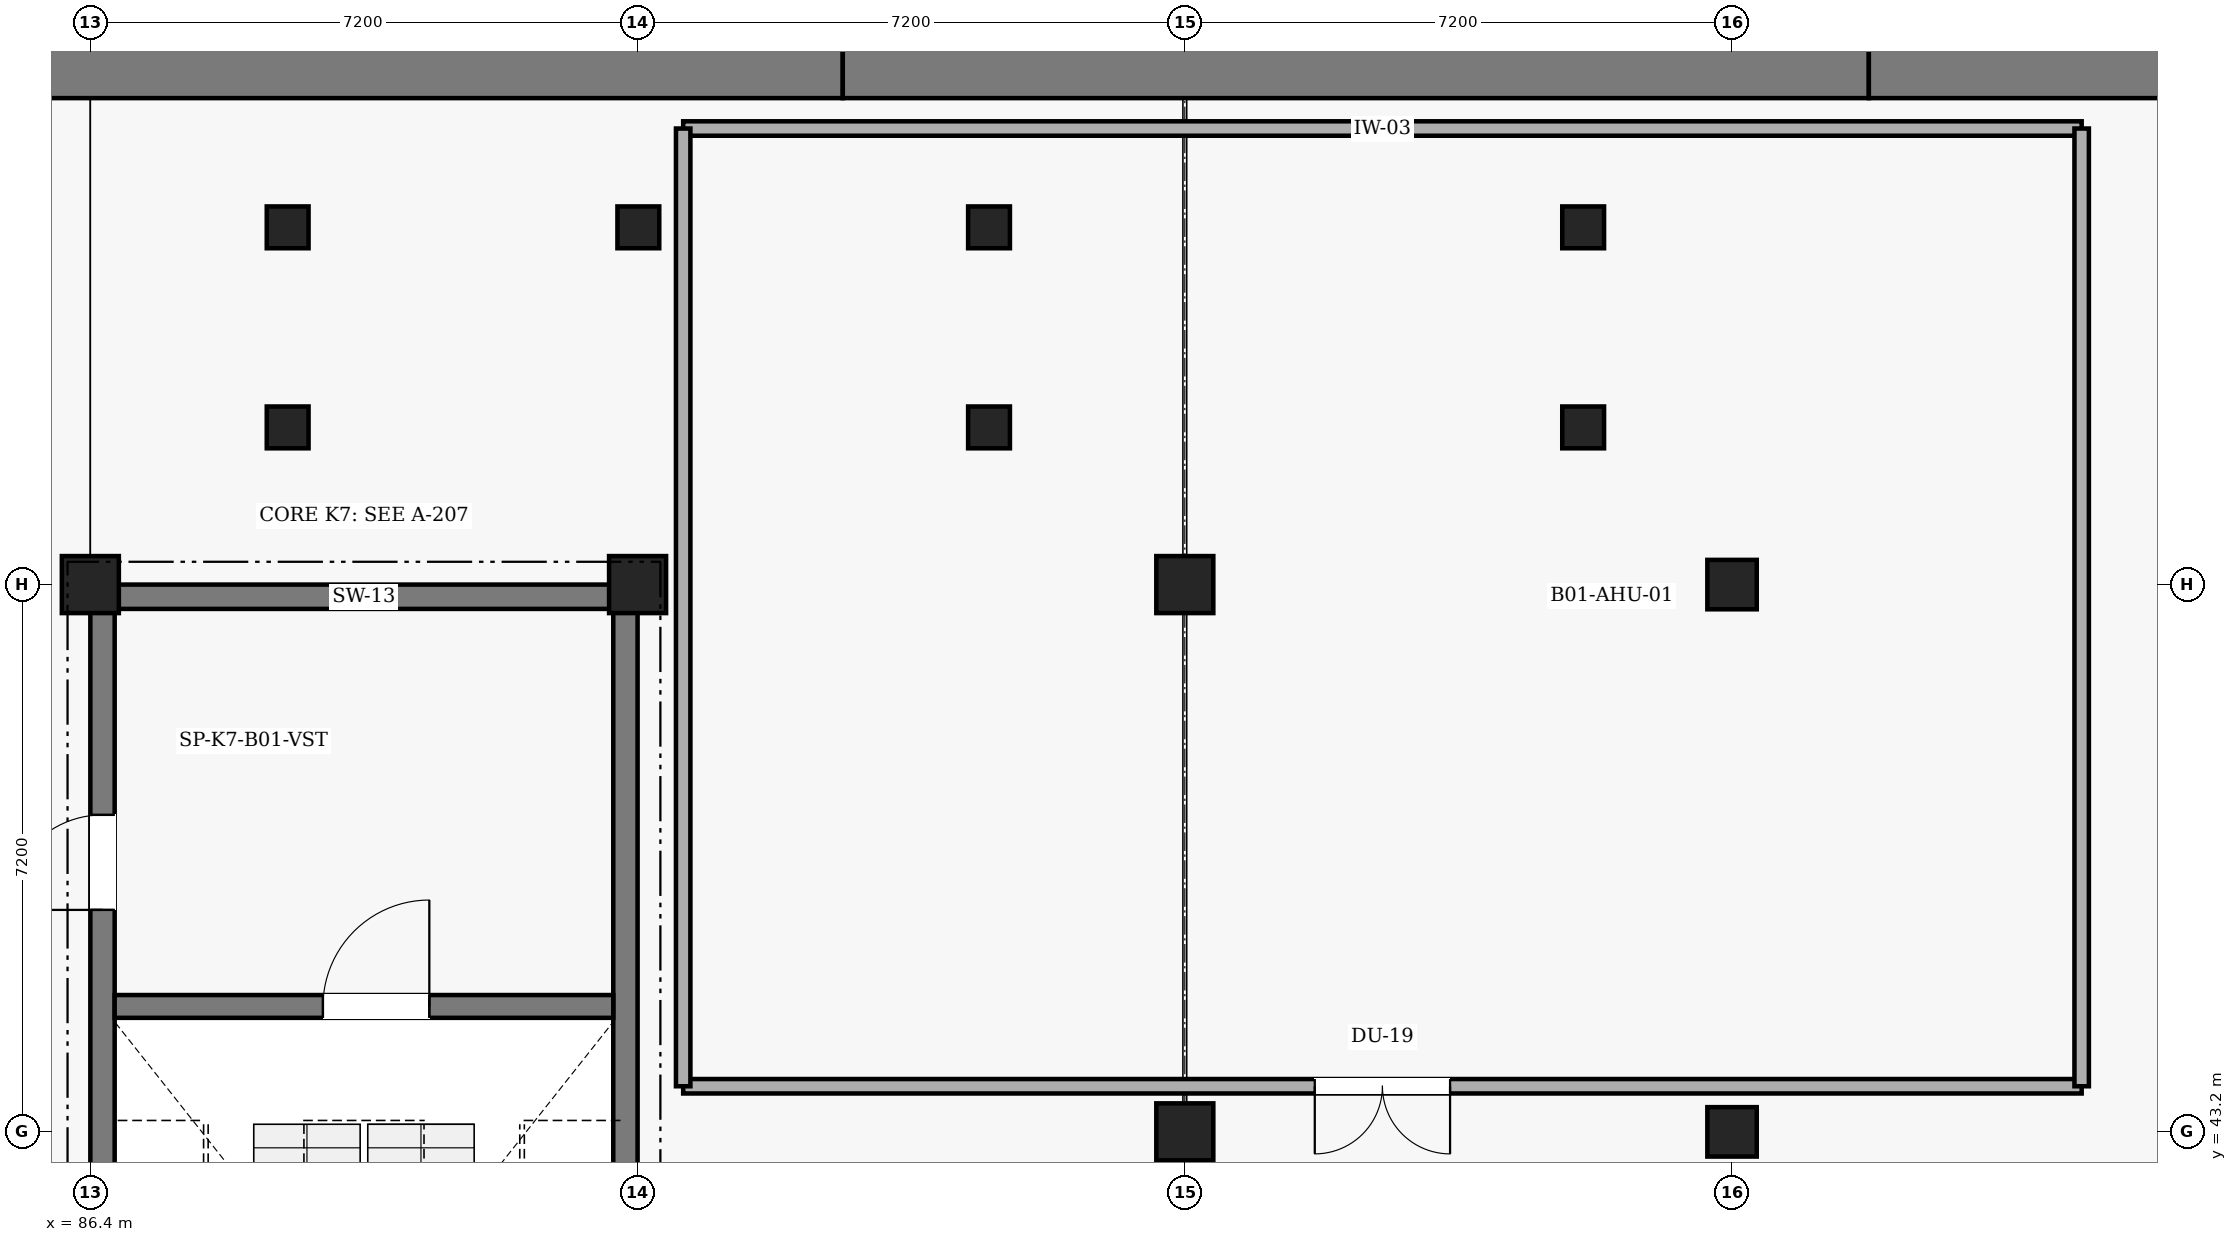
"""IFC4 building model, lengths in metres.
Left out: names, types, materials, properties, quantities, classifications, styles, units other than length and angle.
Written with IfcOpenShell. Run it as: python <this file> out.ifc"""

import sys

from ifc_helpers import new_model, si_unit, direction, frame, frame_2d, origin, origin_2d, place, context, subcontext, project, spatial, rectangle, extrude, element, fill, save


model = new_model("IFC4")
c1 = context("Model", 3, precision=1e-05, world=origin(), true_north=direction((0.0, 1.0)))
c2 = subcontext(c1, "Body", "Model", "MODEL_VIEW")
j1 = project(units=[si_unit("LENGTHUNIT", "METRE"), si_unit("PLANEANGLEUNIT", "RADIAN")], contexts=[c1])
p1 = place(None, origin())
s1 = spatial("IfcSite", under=j1, at=p1, CompositionType="ELEMENT")
p2 = place(p1, origin())
s2 = spatial("IfcBuilding", under=s1, at=p2, CompositionType="ELEMENT")
p3 = place(p2, frame((0.0, 0.0, -5.4)))
s3 = spatial("IfcBuildingStorey", under=s2, at=p3, CompositionType="ELEMENT", Elevation=-5.4)
for number, where, z_axis, x_axis in (
    (1, (82.8, 57.2, 0.0), (0.0, 0.0, 1.0), (1.0, 0.0, 0.0)),
    (2, (96.3, 57.2, 0.0), (0.0, 0.0, 1.0), (1.0, 0.0, 0.0)),
):
    element("IfcWall", number, at=place(p3, frame(where, z_axis=z_axis, x_axis=x_axis)), inside=s3, PredefinedType="USERDEFINED", context=c2, shape_type="SweptSolid", body=[
        extrude(rectangle(XDim=13.5, YDim=0.8, at=frame_2d((6.75, 0.0))), origin(), (0.0, 0.0, 1.0), 4.95),
    ])
p4 = place(p3, frame((109.8, 57.2, 0.0), z_axis=(0.0, 0.0, 1.0), x_axis=(1.0, 0.0, 0.0)))
e3 = element("IfcWall", 3, at=p4, inside=s3, PredefinedType="USERDEFINED", context=c2, shape_type="SweptSolid", body=[
    extrude(rectangle(XDim=5.35, YDim=0.8, at=frame_2d((2.675, 0.0))), origin(), (0.0, 0.0, 1.0), 4.95),
])
p5 = place(p3, frame((86.4, 50.24, 0.0), z_axis=(0.0, 0.0, 1.0), x_axis=(1.0, 0.0, 0.0)))
e4 = element("IfcWall", 4, at=p5, inside=s3, PredefinedType="SHEAR", context=c2, shape_type="SweptSolid", body=[
    extrude(rectangle(XDim=7.2, YDim=0.32, at=frame_2d((3.6, 0.0))), origin(), (0.0, 0.0, 1.0), 5.4),
])
p6 = place(p3, frame((93.44, 50.08, 0.0), z_axis=(0.0, 0.0, 1.0), x_axis=(0.0, -1.0, 0.0)))
e5 = element("IfcWall", 5, at=p6, inside=s3, PredefinedType="SHEAR", context=c2, shape_type="SweptSolid", body=[
    extrude(rectangle(XDim=13.76, YDim=0.32, at=frame_2d((6.88, 0.0))), origin(), (0.0, 0.0, 1.0), 5.4),
])
p7 = place(p3, frame((86.56, 36.32, 0.0), z_axis=(0.0, 0.0, 1.0), x_axis=(0.0, 1.0, 0.0)))
e6 = element("IfcWall", 6, at=p7, inside=s3, PredefinedType="SHEAR", context=c2, shape_type="SweptSolid", body=[
    extrude(rectangle(XDim=13.76, YDim=0.32, at=frame_2d((6.88, 0.0))), origin(), (0.0, 0.0, 1.0), 5.4),
])
p8 = place(p7, frame((9.8, 0.0, 0.0)))
e7 = element("IfcOpeningElement", 7, at=p8, cuts=e6, PredefinedType="OPENING", context=c2, shape_type="SweptSolid", body=[
    extrude(rectangle(XDim=1.25, YDim=2.2, at=frame_2d((0.625, 1.1))), frame((0.0, 0.17, 0.0), z_axis=(0.0, -1.0, 0.0), x_axis=(1.0, 0.0, 0.0)), (0.0, 0.0, 1.0), 0.34),
])
p9 = place(p3, frame((86.72, 44.85, 0.0), z_axis=(0.0, 0.0, 1.0), x_axis=(1.0, 0.0, 0.0)))
e8 = element("IfcWall", 8, at=p9, inside=s3, PredefinedType="SHEAR", context=c2, shape_type="SweptSolid", body=[
    extrude(rectangle(XDim=6.56, YDim=0.3, at=frame_2d((3.28, 0.0))), origin(), (0.0, 0.0, 1.0), 5.4),
])
p10 = place(p9, frame((2.74, 0.0, 0.0)))
e9 = element("IfcOpeningElement", 9, at=p10, cuts=e8, PredefinedType="OPENING", context=c2, shape_type="SweptSolid", body=[
    extrude(rectangle(XDim=1.4, YDim=2.2, at=frame_2d((0.7, 1.1))), frame((0.0, 0.16, 0.0), z_axis=(0.0, -1.0, 0.0), x_axis=(1.0, 0.0, 0.0)), (0.0, 0.0, 1.0), 0.32),
])
for number, where, z_axis, x_axis in (
    (10, (86.4, 50.4, 0.0), (0.0, 0.0, 1.0), (1.0, 0.0, 0.0)),
    (11, (93.6, 50.4, 0.0), (0.0, 0.0, 1.0), (1.0, 0.0, 0.0)),
    (12, (100.8, 43.2, 0.0), (0.0, 0.0, 1.0), (1.0, 0.0, 0.0)),
    (13, (100.8, 50.4, 0.0), (0.0, 0.0, 1.0), (1.0, 0.0, 0.0)),
):
    element("IfcColumn", number, at=place(p3, frame(where, z_axis=z_axis, x_axis=x_axis)), inside=s3, PredefinedType="COLUMN", context=c2, shape_type="SweptSolid", body=[
        extrude(rectangle(XDim=0.75, YDim=0.75, at=origin_2d()), origin(), (0.0, 0.0, 1.0), 4.95),
    ])
for number, where, z_axis, x_axis in (
    (14, (108.0, 43.2, 0.0), (0.0, 0.0, 1.0), (1.0, 0.0, 0.0)),
    (15, (108.0, 50.4, 0.0), (0.0, 0.0, 1.0), (1.0, 0.0, 0.0)),
):
    element("IfcColumn", number, at=place(p3, frame(where, z_axis=z_axis, x_axis=x_axis)), inside=s3, PredefinedType="COLUMN", context=c2, shape_type="SweptSolid", body=[
        extrude(rectangle(XDim=0.65, YDim=0.65, at=origin_2d()), origin(), (0.0, 0.0, 1.0), 5.04),
    ])
for number, where, z_axis, x_axis in (
    (16, (106.041, 52.468, 0.0), (0.0, 0.0, 1.0), (1.0, 0.0, 0.0)),
    (17, (106.041, 55.1, 0.0), (0.0, 0.0, 1.0), (1.0, 0.0, 0.0)),
    (18, (88.996, 52.468, 0.0), (0.0, 0.0, 1.0), (1.0, 0.0, 0.0)),
    (19, (88.996, 55.1, 0.0), (0.0, 0.0, 1.0), (1.0, 0.0, 0.0)),
    (20, (93.61, 55.1, 0.0), (0.0, 0.0, 1.0), (1.0, 0.0, 0.0)),
    (21, (98.224, 52.468, 0.0), (0.0, 0.0, 1.0), (1.0, 0.0, 0.0)),
    (22, (98.224, 55.1, 0.0), (0.0, 0.0, 1.0), (1.0, 0.0, 0.0)),
):
    element("IfcColumn", number, at=place(p3, frame(where, z_axis=z_axis, x_axis=x_axis)), inside=s3, PredefinedType="COLUMN", context=c2, shape_type="SweptSolid", body=[
        extrude(rectangle(XDim=0.55, YDim=0.55, at=origin_2d()), origin(), (0.0, 0.0, 1.0), 4.95),
    ])
p11 = place(p3, frame((94.2, 56.4, 0.0), z_axis=(0.0, 0.0, 1.0), x_axis=(1.0, 0.0, 0.0)))
e23 = element("IfcWall", 23, at=p11, inside=s3, PredefinedType="PARTITIONING", context=c2, shape_type="SweptSolid", body=[
    extrude(rectangle(XDim=18.4, YDim=0.19, at=frame_2d((9.2, 0.0))), origin(), (0.0, 0.0, 1.0), 5.05),
])
p12 = place(p3, frame((112.6, 43.8, 0.0), z_axis=(0.0, 0.0, 1.0), x_axis=(-1.0, 0.0, 0.0)))
e24 = element("IfcWall", 24, at=p12, inside=s3, PredefinedType="PARTITIONING", context=c2, shape_type="SweptSolid", body=[
    extrude(rectangle(XDim=18.4, YDim=0.19, at=frame_2d((9.2, 0.0))), origin(), (0.0, 0.0, 1.0), 4.24),
])
p13 = place(p12, frame((8.31, 0.0, 0.0)))
e25 = element("IfcOpeningElement", 25, at=p13, cuts=e24, PredefinedType="OPENING", context=c2, shape_type="SweptSolid", body=[
    extrude(rectangle(XDim=1.78, YDim=2.28, at=frame_2d((0.89, 1.14))), frame((0.0, 0.105, 0.0), z_axis=(0.0, -1.0, 0.0), x_axis=(1.0, 0.0, 0.0)), (0.0, 0.0, 1.0), 0.21),
])
for number, where, z_axis, x_axis in (
    (26, (112.6, 56.4, 0.0), (0.0, 0.0, 1.0), (0.0, -1.0, 0.0)),
    (27, (94.2, 43.8, 0.0), (0.0, 0.0, 1.0), (0.0, 1.0, 0.0)),
):
    element("IfcWall", number, at=place(p3, frame(where, z_axis=z_axis, x_axis=x_axis)), inside=s3, PredefinedType="PARTITIONING", context=c2, shape_type="SweptSolid", body=[
        extrude(rectangle(XDim=12.6, YDim=0.19, at=frame_2d((6.3, 0.0))), origin(), (0.0, 0.0, 1.0), 4.45),
    ])
p14 = place(p10, origin())
e28 = element("IfcDoor", 28, at=p14, inside=s3, OperationType="SINGLE_SWING_RIGHT", PredefinedType="DOOR", context=c2, shape_type="SweptSolid", body=[
    extrude(rectangle(XDim=1.4, YDim=2.2, at=frame_2d((0.7, 1.1))), frame((0.0, 0.025, 0.0), z_axis=(0.0, -1.0, 0.0), x_axis=(1.0, 0.0, 0.0)), (0.0, 0.0, 1.0), 0.05),
])
fill(e9, e28)
p15 = place(p8, origin())
e29 = element("IfcDoor", 29, at=p15, inside=s3, OperationType="SINGLE_SWING_LEFT", PredefinedType="DOOR", context=c2, shape_type="SweptSolid", body=[
    extrude(rectangle(XDim=1.25, YDim=2.2, at=frame_2d((0.625, 1.1))), frame((0.0, 0.025, 0.0), z_axis=(0.0, -1.0, 0.0), x_axis=(1.0, 0.0, 0.0)), (0.0, 0.0, 1.0), 0.05),
])
fill(e7, e29)
p16 = place(p13, origin())
e30 = element("IfcDoor", 30, at=p16, inside=s3, OperationType="DOUBLE_DOOR_SINGLE_SWING", PredefinedType="DOOR", context=c2, shape_type="SweptSolid", body=[
    extrude(rectangle(XDim=1.78, YDim=2.28, at=frame_2d((0.89, 1.14))), frame((0.0, 0.025, 0.0), z_axis=(0.0, -1.0, 0.0), x_axis=(1.0, 0.0, 0.0)), (0.0, 0.0, 1.0), 0.05),
])
fill(e25, e30)
save(model, sys.argv[1])
